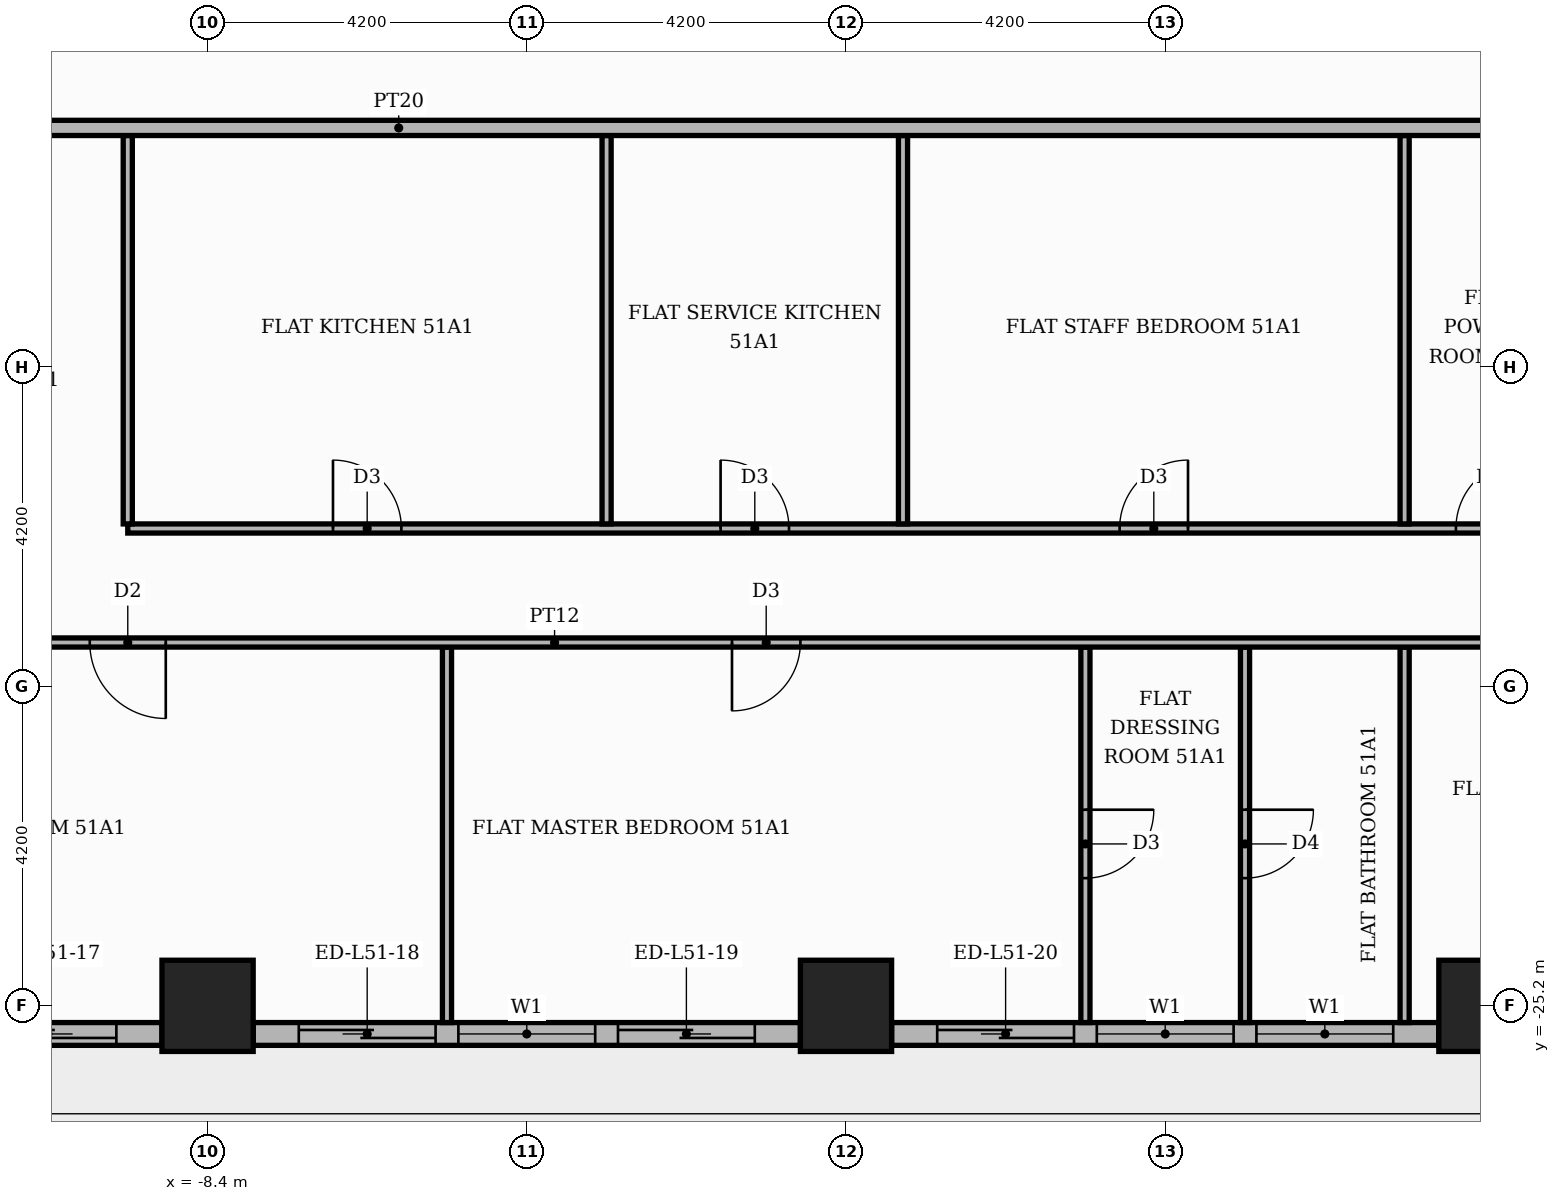
"""IFC4 building model, lengths in metres.
Left out: names, types, materials, properties, quantities, classifications, styles, units other than length and angle.
Written with IfcOpenShell. Run it as: python <this file> out.ifc"""

import sys

from ifc_helpers import new_model, si_unit, direction, frame, frame_2d, origin, origin_2d, place, context, subcontext, project, spatial, rectangle, extrude, element, fill, save


model = new_model("IFC4")
c1 = context("Model", 3, precision=1e-05, world=origin(), true_north=direction((0.0, 1.0)))
c2 = subcontext(c1, "Body", "Model", "MODEL_VIEW")
j1 = project(units=[si_unit("LENGTHUNIT", "METRE"), si_unit("PLANEANGLEUNIT", "RADIAN")], contexts=[c1])
p1 = place(None, origin())
s1 = spatial("IfcSite", under=j1, at=p1, CompositionType="ELEMENT")
p2 = place(p1, origin())
s2 = spatial("IfcBuilding", under=s1, at=p2, CompositionType="ELEMENT")
p3 = place(p2, frame((0.0, 0.0, 215.7)))
s3 = spatial("IfcBuildingStorey", under=s2, at=p3, CompositionType="ELEMENT", Elevation=215.7)
for number, where, z_axis, x_axis in (
    (1, (0.0, -25.2, 0.0), (0.0, 0.0, 1.0), (1.0, 0.0, 0.0)),
    (2, (8.4, -25.2, 0.0), (0.0, 0.0, 1.0), (1.0, 0.0, 0.0)),
    (3, (-8.4, -25.2, 0.0), (0.0, 0.0, 1.0), (1.0, 0.0, 0.0)),
):
    element("IfcColumn", number, at=place(p3, frame(where, z_axis=z_axis, x_axis=x_axis)), inside=s3, PredefinedType="COLUMN", context=c2, shape_type="SweptSolid", body=[
        extrude(rectangle(XDim=1.2, YDim=1.2, at=origin_2d()), origin(), (0.0, 0.0, 1.0), 3.9),
    ])
p4 = place(p3, frame((-16.2, -25.57, 0.0), z_axis=(0.0, 0.0, 1.0), x_axis=(1.0, 0.0, 0.0)))
e4 = element("IfcWall", 4, at=p4, inside=s3, PredefinedType="STANDARD", context=c2, shape_type="SweptSolid", body=[
    extrude(rectangle(XDim=7.2, YDim=0.3, at=frame_2d((3.6, 0.0))), origin(), (0.0, 0.0, 1.0), 3.48),
])
p5 = place(p4, frame((0.6, 0.0, 0.0)))
e5 = element("IfcOpeningElement", 5, at=p5, cuts=e4, PredefinedType="OPENING", context=c2, shape_type="SweptSolid", body=[
    extrude(rectangle(XDim=1.8, YDim=2.4, at=frame_2d((0.9, 1.2))), frame((0.0, 0.16, 0.0), z_axis=(0.0, -1.0, 0.0), x_axis=(1.0, 0.0, 0.0)), (0.0, 0.0, 1.0), 0.32),
])
p6 = place(p4, frame((2.7, 0.0, 0.9)))
e6 = element("IfcOpeningElement", 6, at=p6, cuts=e4, PredefinedType="OPENING", context=c2, shape_type="SweptSolid", body=[
    extrude(rectangle(XDim=1.8, YDim=2.1, at=frame_2d((0.9, 1.05))), frame((0.0, 0.16, 0.0), z_axis=(0.0, -1.0, 0.0), x_axis=(1.0, 0.0, 0.0)), (0.0, 0.0, 1.0), 0.32),
])
p7 = place(p4, frame((4.8, 0.0, 0.0)))
e7 = element("IfcOpeningElement", 7, at=p7, cuts=e4, PredefinedType="OPENING", context=c2, shape_type="SweptSolid", body=[
    extrude(rectangle(XDim=1.8, YDim=2.4, at=frame_2d((0.9, 1.2))), frame((0.0, 0.16, 0.0), z_axis=(0.0, -1.0, 0.0), x_axis=(1.0, 0.0, 0.0)), (0.0, 0.0, 1.0), 0.32),
])
p8 = place(p3, frame((-7.8, -25.57, 0.0), z_axis=(0.0, 0.0, 1.0), x_axis=(1.0, 0.0, 0.0)))
e8 = element("IfcWall", 8, at=p8, inside=s3, PredefinedType="STANDARD", context=c2, shape_type="SweptSolid", body=[
    extrude(rectangle(XDim=7.2, YDim=0.3, at=frame_2d((3.6, 0.0))), origin(), (0.0, 0.0, 1.0), 3.48),
])
p9 = place(p8, frame((0.6, 0.0, 0.0)))
e9 = element("IfcOpeningElement", 9, at=p9, cuts=e8, PredefinedType="OPENING", context=c2, shape_type="SweptSolid", body=[
    extrude(rectangle(XDim=1.8, YDim=2.4, at=frame_2d((0.9, 1.2))), frame((0.0, 0.16, 0.0), z_axis=(0.0, -1.0, 0.0), x_axis=(1.0, 0.0, 0.0)), (0.0, 0.0, 1.0), 0.32),
])
p10 = place(p8, frame((2.7, 0.0, 0.9)))
e10 = element("IfcOpeningElement", 10, at=p10, cuts=e8, PredefinedType="OPENING", context=c2, shape_type="SweptSolid", body=[
    extrude(rectangle(XDim=1.8, YDim=2.1, at=frame_2d((0.9, 1.05))), frame((0.0, 0.16, 0.0), z_axis=(0.0, -1.0, 0.0), x_axis=(1.0, 0.0, 0.0)), (0.0, 0.0, 1.0), 0.32),
])
p11 = place(p8, frame((4.8, 0.0, 0.0)))
e11 = element("IfcOpeningElement", 11, at=p11, cuts=e8, PredefinedType="OPENING", context=c2, shape_type="SweptSolid", body=[
    extrude(rectangle(XDim=1.8, YDim=2.4, at=frame_2d((0.9, 1.2))), frame((0.0, 0.16, 0.0), z_axis=(0.0, -1.0, 0.0), x_axis=(1.0, 0.0, 0.0)), (0.0, 0.0, 1.0), 0.32),
])
p12 = place(p3, frame((0.6, -25.57, 0.0), z_axis=(0.0, 0.0, 1.0), x_axis=(1.0, 0.0, 0.0)))
e12 = element("IfcWall", 12, at=p12, inside=s3, PredefinedType="STANDARD", context=c2, shape_type="SweptSolid", body=[
    extrude(rectangle(XDim=7.2, YDim=0.3, at=frame_2d((3.6, 0.0))), origin(), (0.0, 0.0, 1.0), 3.48),
])
p13 = place(p12, frame((0.6, 0.0, 0.0)))
e13 = element("IfcOpeningElement", 13, at=p13, cuts=e12, PredefinedType="OPENING", context=c2, shape_type="SweptSolid", body=[
    extrude(rectangle(XDim=1.8, YDim=2.4, at=frame_2d((0.9, 1.2))), frame((0.0, 0.16, 0.0), z_axis=(0.0, -1.0, 0.0), x_axis=(1.0, 0.0, 0.0)), (0.0, 0.0, 1.0), 0.32),
])
p14 = place(p12, frame((2.7, 0.0, 0.9)))
e14 = element("IfcOpeningElement", 14, at=p14, cuts=e12, PredefinedType="OPENING", context=c2, shape_type="SweptSolid", body=[
    extrude(rectangle(XDim=1.8, YDim=2.1, at=frame_2d((0.9, 1.05))), frame((0.0, 0.16, 0.0), z_axis=(0.0, -1.0, 0.0), x_axis=(1.0, 0.0, 0.0)), (0.0, 0.0, 1.0), 0.32),
])
p15 = place(p12, frame((4.8, 0.0, 0.9)))
e15 = element("IfcOpeningElement", 15, at=p15, cuts=e12, PredefinedType="OPENING", context=c2, shape_type="SweptSolid", body=[
    extrude(rectangle(XDim=1.8, YDim=2.1, at=frame_2d((0.9, 1.05))), frame((0.0, 0.16, 0.0), z_axis=(0.0, -1.0, 0.0), x_axis=(1.0, 0.0, 0.0)), (0.0, 0.0, 1.0), 0.32),
])
p16 = place(p3, frame((-5.25, -25.42, 0.0), z_axis=(0.0, 0.0, 1.0), x_axis=(0.0, 1.0, 0.0)))
e16 = element("IfcWall", 16, at=p16, inside=s3, PredefinedType="PARTITIONING", context=c2, shape_type="SweptSolid", body=[
    extrude(rectangle(XDim=4.94, YDim=0.12, at=frame_2d((2.47, 0.0))), origin(), (0.0, 0.0, 1.0), 3.48),
])
p17 = place(p3, frame((3.15, -25.42, 0.0), z_axis=(0.0, 0.0, 1.0), x_axis=(0.0, 1.0, 0.0)))
e17 = element("IfcWall", 17, at=p17, inside=s3, PredefinedType="PARTITIONING", context=c2, shape_type="SweptSolid", body=[
    extrude(rectangle(XDim=4.94, YDim=0.12, at=frame_2d((2.47, 0.0))), origin(), (0.0, 0.0, 1.0), 3.48),
])
p18 = place(p17, frame((1.9, 0.0, 0.0)))
e18 = element("IfcOpeningElement", 18, at=p18, cuts=e17, PredefinedType="OPENING", context=c2, shape_type="SweptSolid", body=[
    extrude(rectangle(XDim=0.9, YDim=2.1, at=frame_2d((0.45, 1.05))), frame((0.0, 0.07, 0.0), z_axis=(0.0, -1.0, 0.0), x_axis=(1.0, 0.0, 0.0)), (0.0, 0.0, 1.0), 0.14),
])
p19 = place(p3, frame((5.25, -25.42, 0.0), z_axis=(0.0, 0.0, 1.0), x_axis=(0.0, 1.0, 0.0)))
e19 = element("IfcWall", 19, at=p19, inside=s3, PredefinedType="PARTITIONING", context=c2, shape_type="SweptSolid", body=[
    extrude(rectangle(XDim=4.94, YDim=0.12, at=frame_2d((2.47, 0.0))), origin(), (0.0, 0.0, 1.0), 3.48),
])
p20 = place(p19, frame((1.9, 0.0, 0.0)))
e20 = element("IfcOpeningElement", 20, at=p20, cuts=e19, PredefinedType="OPENING", context=c2, shape_type="SweptSolid", body=[
    extrude(rectangle(XDim=0.9, YDim=2.1, at=frame_2d((0.45, 1.05))), frame((0.0, 0.07, 0.0), z_axis=(0.0, -1.0, 0.0), x_axis=(1.0, 0.0, 0.0)), (0.0, 0.0, 1.0), 0.14),
])
p21 = place(p3, frame((7.35, -25.42, 0.0), z_axis=(0.0, 0.0, 1.0), x_axis=(0.0, 1.0, 0.0)))
e21 = element("IfcWall", 21, at=p21, inside=s3, PredefinedType="PARTITIONING", context=c2, shape_type="SweptSolid", body=[
    extrude(rectangle(XDim=4.94, YDim=0.12, at=frame_2d((2.47, 0.0))), origin(), (0.0, 0.0, 1.0), 3.48),
])
p22 = place(p3, frame((-21.219, -20.42, 0.0), z_axis=(0.0, 0.0, 1.0), x_axis=(1.0, 0.0, 0.0)))
e22 = element("IfcWall", 22, at=p22, inside=s3, PredefinedType="PARTITIONING", context=c2, shape_type="SweptSolid", body=[
    extrude(rectangle(XDim=34.769, YDim=0.12, at=frame_2d((17.385, 0.0))), origin(), (0.0, 0.0, 1.0), 3.48),
])
p23 = place(p22, frame((6.019, 0.0, 0.0)))
e23 = element("IfcOpeningElement", 23, at=p23, cuts=e22, PredefinedType="OPENING", context=c2, shape_type="SweptSolid", body=[
    extrude(rectangle(XDim=1.0, YDim=2.1, at=frame_2d((0.5, 1.05))), frame((0.0, 0.07, 0.0), z_axis=(0.0, -1.0, 0.0), x_axis=(1.0, 0.0, 0.0)), (0.0, 0.0, 1.0), 0.14),
])
p24 = place(p22, frame((11.269, 0.0, 0.0)))
e24 = element("IfcOpeningElement", 24, at=p24, cuts=e22, PredefinedType="OPENING", context=c2, shape_type="SweptSolid", body=[
    extrude(rectangle(XDim=1.0, YDim=2.1, at=frame_2d((0.5, 1.05))), frame((0.0, 0.07, 0.0), z_axis=(0.0, -1.0, 0.0), x_axis=(1.0, 0.0, 0.0)), (0.0, 0.0, 1.0), 0.14),
])
p25 = place(p22, frame((19.719, 0.0, 0.0)))
e25 = element("IfcOpeningElement", 25, at=p25, cuts=e22, PredefinedType="OPENING", context=c2, shape_type="SweptSolid", body=[
    extrude(rectangle(XDim=0.9, YDim=2.1, at=frame_2d((0.45, 1.05))), frame((0.0, 0.07, 0.0), z_axis=(0.0, -1.0, 0.0), x_axis=(1.0, 0.0, 0.0)), (0.0, 0.0, 1.0), 0.14),
])
p26 = place(p22, frame((30.219, 0.0, 0.0)))
e26 = element("IfcOpeningElement", 26, at=p26, cuts=e22, PredefinedType="OPENING", context=c2, shape_type="SweptSolid", body=[
    extrude(rectangle(XDim=0.9, YDim=2.1, at=frame_2d((0.45, 1.05))), frame((0.0, 0.07, 0.0), z_axis=(0.0, -1.0, 0.0), x_axis=(1.0, 0.0, 0.0)), (0.0, 0.0, 1.0), 0.14),
])
p27 = place(p3, frame((-9.45, -18.92, 0.0), z_axis=(0.0, 0.0, 1.0), x_axis=(1.0, 0.0, 0.0)))
e27 = element("IfcWall", 27, at=p27, inside=s3, PredefinedType="PARTITIONING", context=c2, shape_type="SweptSolid", body=[
    extrude(rectangle(XDim=23.0, YDim=0.12, at=frame_2d((11.5, 0.0))), origin(), (0.0, 0.0, 1.0), 3.48),
])
p28 = place(p27, frame((2.7, 0.0, 0.0)))
e28 = element("IfcOpeningElement", 28, at=p28, cuts=e27, PredefinedType="OPENING", context=c2, shape_type="SweptSolid", body=[
    extrude(rectangle(XDim=0.9, YDim=2.1, at=frame_2d((0.45, 1.05))), frame((0.0, 0.07, 0.0), z_axis=(0.0, -1.0, 0.0), x_axis=(1.0, 0.0, 0.0)), (0.0, 0.0, 1.0), 0.14),
])
p29 = place(p27, frame((7.8, 0.0, 0.0)))
e29 = element("IfcOpeningElement", 29, at=p29, cuts=e27, PredefinedType="OPENING", context=c2, shape_type="SweptSolid", body=[
    extrude(rectangle(XDim=0.9, YDim=2.1, at=frame_2d((0.45, 1.05))), frame((0.0, 0.07, 0.0), z_axis=(0.0, -1.0, 0.0), x_axis=(1.0, 0.0, 0.0)), (0.0, 0.0, 1.0), 0.14),
])
p30 = place(p27, frame((13.05, 0.0, 0.0)))
e30 = element("IfcOpeningElement", 30, at=p30, cuts=e27, PredefinedType="OPENING", context=c2, shape_type="SweptSolid", body=[
    extrude(rectangle(XDim=0.9, YDim=2.1, at=frame_2d((0.45, 1.05))), frame((0.0, 0.07, 0.0), z_axis=(0.0, -1.0, 0.0), x_axis=(1.0, 0.0, 0.0)), (0.0, 0.0, 1.0), 0.14),
])
p31 = place(p27, frame((17.475, 0.0, 0.0)))
e31 = element("IfcOpeningElement", 31, at=p31, cuts=e27, PredefinedType="OPENING", context=c2, shape_type="SweptSolid", body=[
    extrude(rectangle(XDim=0.9, YDim=2.1, at=frame_2d((0.45, 1.05))), frame((0.0, 0.07, 0.0), z_axis=(0.0, -1.0, 0.0), x_axis=(1.0, 0.0, 0.0)), (0.0, 0.0, 1.0), 0.14),
])
p32 = place(p27, frame((20.625, 0.0, 0.0)))
e32 = element("IfcOpeningElement", 32, at=p32, cuts=e27, PredefinedType="OPENING", context=c2, shape_type="SweptSolid", body=[
    extrude(rectangle(XDim=0.9, YDim=2.1, at=frame_2d((0.45, 1.05))), frame((0.0, 0.07, 0.0), z_axis=(0.0, -1.0, 0.0), x_axis=(1.0, 0.0, 0.0)), (0.0, 0.0, 1.0), 0.14),
])
for number, where, z_axis, x_axis in (
    (33, (-9.45, -18.86, 0.0), (0.0, 0.0, 1.0), (0.0, 1.0, 0.0)),
    (34, (-3.15, -18.86, 0.0), (0.0, 0.0, 1.0), (0.0, 1.0, 0.0)),
    (35, (0.75, -18.86, 0.0), (0.0, 0.0, 1.0), (0.0, 1.0, 0.0)),
    (36, (7.35, -18.86, 0.0), (0.0, 0.0, 1.0), (0.0, 1.0, 0.0)),
):
    element("IfcWall", number, at=place(p3, frame(where, z_axis=z_axis, x_axis=x_axis)), inside=s3, PredefinedType="PARTITIONING", context=c2, shape_type="SweptSolid", body=[
        extrude(rectangle(XDim=5.11, YDim=0.12, at=frame_2d((2.555, 0.0))), origin(), (0.0, 0.0, 1.0), 3.48),
    ])
p33 = place(p3, frame((-25.42, -13.65, 0.0), z_axis=(0.0, 0.0, 1.0), x_axis=(1.0, 0.0, 0.0)))
e37 = element("IfcWall", 37, at=p33, inside=s3, PredefinedType="PARTITIONING", context=c2, shape_type="SweptSolid", body=[
    extrude(rectangle(XDim=39.07, YDim=0.2, at=frame_2d((19.535, 0.0))), origin(), (0.0, 0.0, 1.0), 3.48),
])
p34 = place(p33, frame((13.32, 0.0, 0.0)))
e38 = element("IfcOpeningElement", 38, at=p34, cuts=e37, PredefinedType="OPENING", context=c2, shape_type="SweptSolid", body=[
    extrude(rectangle(XDim=1.1, YDim=2.4, at=frame_2d((0.55, 1.2))), frame((0.0, 0.11, 0.0), z_axis=(0.0, -1.0, 0.0), x_axis=(1.0, 0.0, 0.0)), (0.0, 0.0, 1.0), 0.22),
])
p35 = place(p7, origin())
e39 = element("IfcDoor", 39, at=p35, inside=s3, OperationType="SLIDING_TO_RIGHT", PredefinedType="DOOR", context=c2, shape_type="SweptSolid", body=[
    extrude(rectangle(XDim=1.8, YDim=2.4, at=frame_2d((0.9, 1.2))), frame((0.0, 0.025, 0.0), z_axis=(0.0, -1.0, 0.0), x_axis=(1.0, 0.0, 0.0)), (0.0, 0.0, 1.0), 0.05),
])
fill(e7, e39)
p36 = place(p9, origin())
e40 = element("IfcDoor", 40, at=p36, inside=s3, OperationType="SLIDING_TO_LEFT", PredefinedType="DOOR", context=c2, shape_type="SweptSolid", body=[
    extrude(rectangle(XDim=1.8, YDim=2.4, at=frame_2d((0.9, 1.2))), frame((0.0, 0.025, 0.0), z_axis=(0.0, -1.0, 0.0), x_axis=(1.0, 0.0, 0.0)), (0.0, 0.0, 1.0), 0.05),
])
fill(e9, e40)
p37 = place(p10, origin())
e41 = element("IfcWindow", 41, at=p37, inside=s3, PartitioningType="SINGLE_PANEL", PredefinedType="WINDOW", context=c2, shape_type="SweptSolid", body=[
    extrude(rectangle(XDim=1.8, YDim=2.1, at=frame_2d((0.9, 1.05))), frame((0.0, 0.03, 0.0), z_axis=(0.0, -1.0, 0.0), x_axis=(1.0, 0.0, 0.0)), (0.0, 0.0, 1.0), 0.06),
])
fill(e10, e41)
p38 = place(p11, origin())
e42 = element("IfcDoor", 42, at=p38, inside=s3, OperationType="SLIDING_TO_RIGHT", PredefinedType="DOOR", context=c2, shape_type="SweptSolid", body=[
    extrude(rectangle(XDim=1.8, YDim=2.4, at=frame_2d((0.9, 1.2))), frame((0.0, 0.025, 0.0), z_axis=(0.0, -1.0, 0.0), x_axis=(1.0, 0.0, 0.0)), (0.0, 0.0, 1.0), 0.05),
])
fill(e11, e42)
p39 = place(p13, origin())
e43 = element("IfcDoor", 43, at=p39, inside=s3, OperationType="SLIDING_TO_LEFT", PredefinedType="DOOR", context=c2, shape_type="SweptSolid", body=[
    extrude(rectangle(XDim=1.8, YDim=2.4, at=frame_2d((0.9, 1.2))), frame((0.0, 0.025, 0.0), z_axis=(0.0, -1.0, 0.0), x_axis=(1.0, 0.0, 0.0)), (0.0, 0.0, 1.0), 0.05),
])
fill(e13, e43)
p40 = place(p14, origin())
e44 = element("IfcWindow", 44, at=p40, inside=s3, PartitioningType="SINGLE_PANEL", PredefinedType="WINDOW", context=c2, shape_type="SweptSolid", body=[
    extrude(rectangle(XDim=1.8, YDim=2.1, at=frame_2d((0.9, 1.05))), frame((0.0, 0.03, 0.0), z_axis=(0.0, -1.0, 0.0), x_axis=(1.0, 0.0, 0.0)), (0.0, 0.0, 1.0), 0.06),
])
fill(e14, e44)
p41 = place(p15, origin())
e45 = element("IfcWindow", 45, at=p41, inside=s3, PartitioningType="SINGLE_PANEL", PredefinedType="WINDOW", context=c2, shape_type="SweptSolid", body=[
    extrude(rectangle(XDim=1.8, YDim=2.1, at=frame_2d((0.9, 1.05))), frame((0.0, 0.03, 0.0), z_axis=(0.0, -1.0, 0.0), x_axis=(1.0, 0.0, 0.0)), (0.0, 0.0, 1.0), 0.06),
])
fill(e15, e45)
p42 = place(p28, origin())
e46 = element("IfcDoor", 46, at=p42, inside=s3, OperationType="SINGLE_SWING_LEFT", PredefinedType="DOOR", context=c2, shape_type="SweptSolid", body=[
    extrude(rectangle(XDim=0.9, YDim=2.1, at=frame_2d((0.45, 1.05))), frame((0.0, 0.025, 0.0), z_axis=(0.0, -1.0, 0.0), x_axis=(1.0, 0.0, 0.0)), (0.0, 0.0, 1.0), 0.05),
])
fill(e28, e46)
p43 = place(p29, origin())
e47 = element("IfcDoor", 47, at=p43, inside=s3, OperationType="SINGLE_SWING_LEFT", PredefinedType="DOOR", context=c2, shape_type="SweptSolid", body=[
    extrude(rectangle(XDim=0.9, YDim=2.1, at=frame_2d((0.45, 1.05))), frame((0.0, 0.025, 0.0), z_axis=(0.0, -1.0, 0.0), x_axis=(1.0, 0.0, 0.0)), (0.0, 0.0, 1.0), 0.05),
])
fill(e29, e47)
p44 = place(p30, origin())
e48 = element("IfcDoor", 48, at=p44, inside=s3, OperationType="SINGLE_SWING_RIGHT", PredefinedType="DOOR", context=c2, shape_type="SweptSolid", body=[
    extrude(rectangle(XDim=0.9, YDim=2.1, at=frame_2d((0.45, 1.05))), frame((0.0, 0.025, 0.0), z_axis=(0.0, -1.0, 0.0), x_axis=(1.0, 0.0, 0.0)), (0.0, 0.0, 1.0), 0.05),
])
fill(e30, e48)
p45 = place(p31, origin())
e49 = element("IfcDoor", 49, at=p45, inside=s3, OperationType="SINGLE_SWING_RIGHT", PredefinedType="DOOR", context=c2, shape_type="SweptSolid", body=[
    extrude(rectangle(XDim=0.9, YDim=2.1, at=frame_2d((0.45, 1.05))), frame((0.0, 0.025, 0.0), z_axis=(0.0, -1.0, 0.0), x_axis=(1.0, 0.0, 0.0)), (0.0, 0.0, 1.0), 0.05),
])
fill(e31, e49)
p46 = place(p24, frame((1.0, 0.0, 0.0), z_axis=(0.0, 0.0, 1.0), x_axis=(-1.0, 0.0, 0.0)))
e50 = element("IfcDoor", 50, at=p46, inside=s3, OperationType="SINGLE_SWING_RIGHT", PredefinedType="DOOR", context=c2, shape_type="SweptSolid", body=[
    extrude(rectangle(XDim=1.0, YDim=2.1, at=frame_2d((0.5, 1.05))), frame((0.0, 0.025, 0.0), z_axis=(0.0, -1.0, 0.0), x_axis=(1.0, 0.0, 0.0)), (0.0, 0.0, 1.0), 0.05),
])
fill(e24, e50)
p47 = place(p25, frame((0.9, 0.0, 0.0), z_axis=(0.0, 0.0, 1.0), x_axis=(-1.0, 0.0, 0.0)))
e51 = element("IfcDoor", 51, at=p47, inside=s3, OperationType="SINGLE_SWING_LEFT", PredefinedType="DOOR", context=c2, shape_type="SweptSolid", body=[
    extrude(rectangle(XDim=0.9, YDim=2.1, at=frame_2d((0.45, 1.05))), frame((0.0, 0.025, 0.0), z_axis=(0.0, -1.0, 0.0), x_axis=(1.0, 0.0, 0.0)), (0.0, 0.0, 1.0), 0.05),
])
fill(e25, e51)
p48 = place(p18, frame((0.9, 0.0, 0.0), z_axis=(0.0, 0.0, 1.0), x_axis=(-1.0, 0.0, 0.0)))
e52 = element("IfcDoor", 52, at=p48, inside=s3, OperationType="SINGLE_SWING_RIGHT", PredefinedType="DOOR", context=c2, shape_type="SweptSolid", body=[
    extrude(rectangle(XDim=0.9, YDim=2.1, at=frame_2d((0.45, 1.05))), frame((0.0, 0.025, 0.0), z_axis=(0.0, -1.0, 0.0), x_axis=(1.0, 0.0, 0.0)), (0.0, 0.0, 1.0), 0.05),
])
fill(e18, e52)
p49 = place(p20, frame((0.9, 0.0, 0.0), z_axis=(0.0, 0.0, 1.0), x_axis=(-1.0, 0.0, 0.0)))
e53 = element("IfcDoor", 53, at=p49, inside=s3, OperationType="SINGLE_SWING_RIGHT", PredefinedType="DOOR", context=c2, shape_type="SweptSolid", body=[
    extrude(rectangle(XDim=0.9, YDim=2.1, at=frame_2d((0.45, 1.05))), frame((0.0, 0.025, 0.0), z_axis=(0.0, -1.0, 0.0), x_axis=(1.0, 0.0, 0.0)), (0.0, 0.0, 1.0), 0.05),
])
fill(e20, e53)
save(model, sys.argv[1])
